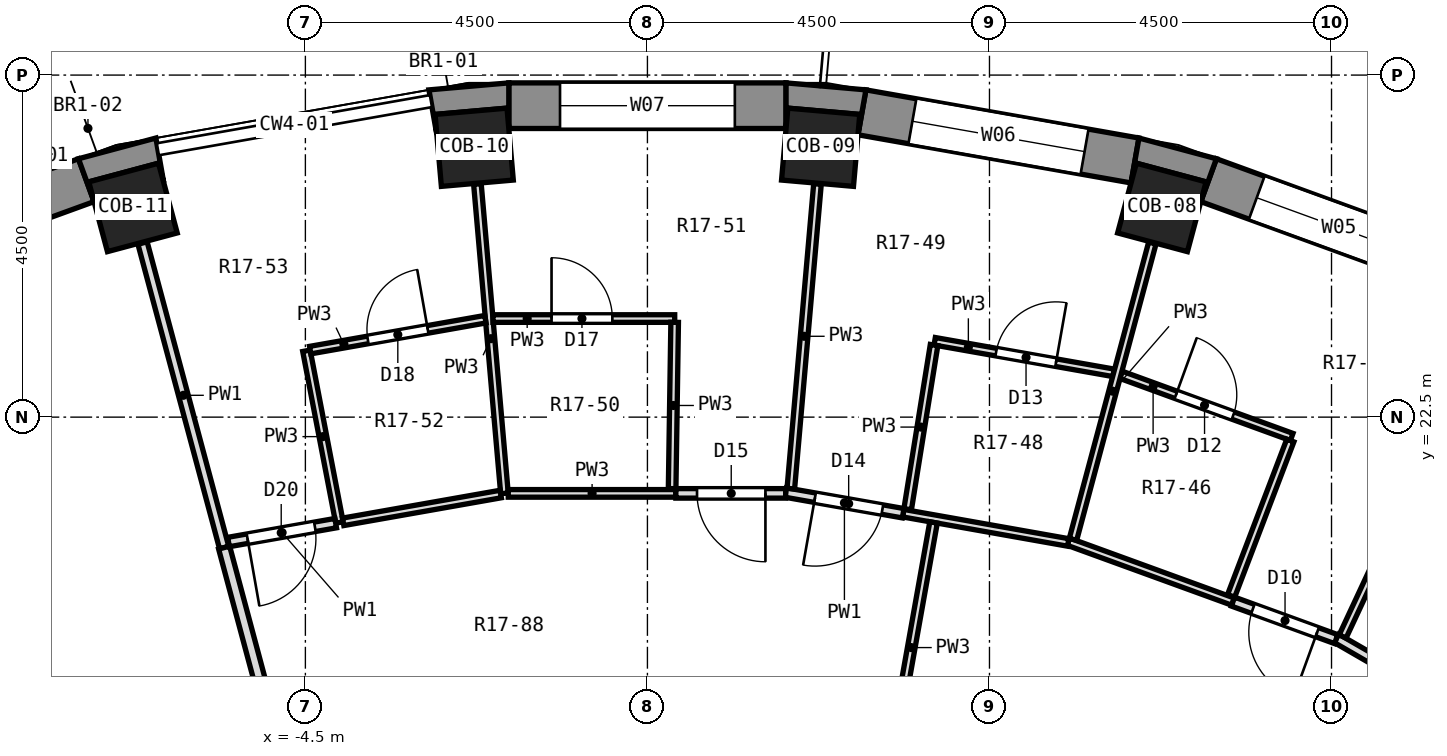
"""IFC4 building model, lengths in metres.
Left out: names, types, materials, properties, quantities, classifications, styles, units other than length and angle.
Written with IfcOpenShell. Run it as: python <this file> out.ifc"""

import sys

from ifc_helpers import new_model, si_unit, direction, frame, frame_2d, origin, origin_2d, place, context, subcontext, project, spatial, polyline, rectangle, outline, extrude, element, fill, save


model = new_model("IFC4")
c1 = context("Model", 3, precision=1e-05, world=origin(), true_north=direction((0.0, 1.0)))
c2 = subcontext(c1, "Body", "Model", "MODEL_VIEW")
j1 = project(units=[si_unit("LENGTHUNIT", "METRE"), si_unit("PLANEANGLEUNIT", "RADIAN")], contexts=[c1])
p1 = place(None, origin())
s1 = spatial("IfcSite", under=j1, at=p1, CompositionType="ELEMENT")
p2 = place(p1, origin())
s2 = spatial("IfcBuilding", under=s1, at=p2, CompositionType="ELEMENT")
p3 = place(p2, frame((0.0, 0.0, 91.9)))
s3 = spatial("IfcBuildingStorey", under=s2, at=p3, CompositionType="ELEMENT", Elevation=91.9)
for number, where, z_axis, x_axis in (
    (1, (6.768, 25.259, 0.0), (0.0, 0.0, 1.0), (0.259, 0.966, 0.0)),
    (2, (2.279, 26.051, 0.0), (0.0, 0.0, 1.0), (0.087, 0.996, 0.0)),
    (3, (-2.279, 26.051, 0.0), (0.0, 0.0, 1.0), (-0.087, 0.996, 0.0)),
    (4, (-6.768, 25.259, 0.0), (0.0, 0.0, 1.0), (-0.259, 0.966, 0.0)),
):
    element("IfcColumn", number, at=place(p3, frame(where, z_axis=z_axis, x_axis=x_axis)), inside=s3, PredefinedType="COLUMN", context=c2, shape_type="SweptSolid", body=[
        extrude(rectangle(XDim=0.95, YDim=0.95, at=origin_2d()), origin(), (0.0, 0.0, 1.0), 3.3),
    ])
p4 = place(p3, frame((10.811, 24.369, 0.0), z_axis=(0.0, 0.0, 1.0), x_axis=(-0.939703505393, 0.341990236633, 0.0)))
e5 = element("IfcWall", 5, at=p4, inside=s3, PredefinedType="SOLIDWALL", context=c2, shape_type="SweptSolid", body=[
    extrude(rectangle(XDim=3.648, YDim=0.6, at=frame_2d((1.824, 0.0))), origin(), (0.0, 0.0, 1.0), 2.8),
])
p5 = place(p4, frame((0.674, 0.0, 0.9)))
e6 = element("IfcOpeningElement", 6, at=p5, cuts=e5, PredefinedType="OPENING", context=c2, shape_type="SweptSolid", body=[
    extrude(rectangle(XDim=2.3, YDim=1.8, at=frame_2d((1.15, 0.9))), frame((0.0, 0.312, 0.0), z_axis=(0.0, -1.0, 0.0), x_axis=(1.0, 0.0, 0.0)), (0.0, 0.0, 1.0), 0.624),
])
p6 = place(p3, frame((6.415, 25.876, 0.0), z_axis=(0.0, 0.0, 1.0), x_axis=(-0.984803764455, 0.173670796382, 0.0)))
e7 = element("IfcWall", 7, at=p6, inside=s3, PredefinedType="SOLIDWALL", context=c2, shape_type="SweptSolid", body=[
    extrude(rectangle(XDim=3.648, YDim=0.6, at=frame_2d((1.824, 0.0))), origin(), (0.0, 0.0, 1.0), 2.8),
])
p7 = place(p6, frame((0.674, 0.0, 0.9)))
e8 = element("IfcOpeningElement", 8, at=p7, cuts=e7, PredefinedType="OPENING", context=c2, shape_type="SweptSolid", body=[
    extrude(rectangle(XDim=2.3, YDim=1.8, at=frame_2d((1.15, 0.9))), frame((0.0, 0.312, 0.0), z_axis=(0.0, -1.0, 0.0), x_axis=(1.0, 0.0, 0.0)), (0.0, 0.0, 1.0), 0.624),
])
p8 = place(p3, frame((1.824, 26.597, 0.0), z_axis=(0.0, 0.0, 1.0), x_axis=(-1.0, 0.0, 0.0)))
e9 = element("IfcWall", 9, at=p8, inside=s3, PredefinedType="SOLIDWALL", context=c2, shape_type="SweptSolid", body=[
    extrude(rectangle(XDim=3.648, YDim=0.6, at=frame_2d((1.824, 0.0))), origin(), (0.0, 0.0, 1.0), 2.8),
])
p9 = place(p8, frame((0.674, 0.0, 0.9)))
e10 = element("IfcOpeningElement", 10, at=p9, cuts=e9, PredefinedType="OPENING", context=c2, shape_type="SweptSolid", body=[
    extrude(rectangle(XDim=2.3, YDim=1.8, at=frame_2d((1.15, 0.9))), frame((0.0, 0.312, 0.0), z_axis=(0.0, -1.0, 0.0), x_axis=(1.0, 0.0, 0.0)), (0.0, 0.0, 1.0), 0.624),
])
p10 = place(p3, frame((-7.383, 25.617, 0.0), z_axis=(0.0, 0.0, 1.0), x_axis=(-0.939703505393, -0.341990236633, 0.0)))
e11 = element("IfcWall", 11, at=p10, inside=s3, PredefinedType="SOLIDWALL", context=c2, shape_type="SweptSolid", body=[
    extrude(rectangle(XDim=3.648, YDim=0.6, at=frame_2d((1.824, 0.0))), origin(), (0.0, 0.0, 1.0), 2.8),
])
p11 = place(p10, frame((0.974, 0.0, 0.0)))
e12 = element("IfcOpeningElement", 12, at=p11, cuts=e11, PredefinedType="OPENING", context=c2, shape_type="SweptSolid", body=[
    extrude(rectangle(XDim=1.7, YDim=2.4, at=frame_2d((0.85, 1.2))), frame((0.0, 0.312, 0.0), z_axis=(0.0, -1.0, 0.0), x_axis=(1.0, 0.0, 0.0)), (0.0, 0.0, 1.0), 0.624),
])
p12 = place(p3, origin())
e13 = element("IfcWall", 13, at=p12, inside=s3, PredefinedType="SOLIDWALL", context=c2, shape_type="SweptSolid", body=[
    extrude(outline(polyline([(7.486, 25.899), (6.467, 26.172), (6.363, 25.581), (6.432, 25.841), (7.35, 25.595), (7.28, 25.335), (7.486, 25.899)])), origin(), (0.0, 0.0, 1.0), 2.8),
])
p13 = place(p3, origin())
e14 = element("IfcWall", 14, at=p13, inside=s3, PredefinedType="SOLIDWALL", context=c2, shape_type="SweptSolid", body=[
    extrude(outline(polyline([(2.875, 26.805), (1.824, 26.897), (1.824, 26.297), (1.847, 26.565), (2.794, 26.482), (2.77, 26.215), (2.875, 26.805)])), origin(), (0.0, 0.0, 1.0), 2.8),
])
p14 = place(p3, origin())
e15 = element("IfcWall", 15, at=p14, inside=s3, PredefinedType="SOLIDWALL", context=c2, shape_type="SweptSolid", body=[
    extrude(outline(polyline([(-2.875, 26.805), (-2.77, 26.215), (-2.794, 26.482), (-1.847, 26.565), (-1.824, 26.297), (-1.824, 26.897), (-2.875, 26.805)])), origin(), (0.0, 0.0, 1.0), 2.8),
])
p15 = place(p3, origin())
e16 = element("IfcWall", 16, at=p15, inside=s3, PredefinedType="SOLIDWALL", context=c2, shape_type="SweptSolid", body=[
    extrude(outline(polyline([(-6.467, 26.172), (-7.486, 25.899), (-7.28, 25.335), (-7.35, 25.595), (-6.432, 25.841), (-6.363, 25.581), (-6.467, 26.172)])), origin(), (0.0, 0.0, 1.0), 2.8),
])
p16 = place(p3, origin())
e17 = element("IfcWall", 17, at=p16, inside=s3, PredefinedType="PARAPET", context=c2, shape_type="SweptSolid", body=[
    extrude(outline(polyline([(-7.573, 28.262), (-12.365, 26.517), (-16.782, 23.967), (-16.437, 23.474), (-12.111, 25.971), (-7.417, 27.68), (-7.573, 28.262)])), origin(), (0.0, 0.0, 1.0), 0.5),
])
p17 = place(p3, frame((-2.237, 25.567, 0.0), z_axis=(0.0, 0.0, 1.0), x_axis=(0.087060211484, -0.996203051379, 0.0)))
e18 = element("IfcWall", 18, at=p17, inside=s3, PredefinedType="PARTITIONING", context=c2, shape_type="SweptSolid", body=[
    extrude(rectangle(XDim=4.086, YDim=0.1, at=frame_2d((2.043, 0.0))), origin(), (0.0, 0.0, 1.0), 2.8),
])
p18 = place(p3, frame((-4.486, 23.373, 0.0), z_axis=(0.0, 0.0, 1.0), x_axis=(0.188701744684, -0.982034445197, 0.0)))
e19 = element("IfcWall", 19, at=p18, inside=s3, PredefinedType="PARTITIONING", context=c2, shape_type="SweptSolid", body=[
    extrude(rectangle(XDim=2.3, YDim=0.1, at=frame_2d((1.15, 0.0))), origin(), (0.0, 0.0, 1.0), 2.8),
])
p19 = place(p3, frame((-6.642, 24.791, 0.0), z_axis=(0.0, 0.0, 1.0), x_axis=(0.258787077678, -0.965934391368, 0.0)))
e20 = element("IfcWall", 20, at=p19, inside=s3, PredefinedType="PARTITIONING", context=c2, shape_type="SweptSolid", body=[
    extrude(rectangle(XDim=4.148, YDim=0.125, at=frame_2d((2.074, 0.0))), origin(), (0.0, 0.0, 1.0), 2.8),
])
p20 = place(p3, frame((-5.569, 20.784, 0.0), z_axis=(0.0, 0.0, 1.0), x_axis=(0.258810886784, -0.965928012267, 0.0)))
e21 = element("IfcWall", 21, at=p20, inside=s3, PredefinedType="PARTITIONING", context=c2, shape_type="SweptSolid", body=[
    extrude(rectangle(XDim=4.949, YDim=0.15, at=frame_2d((2.474, 0.0))), origin(), (0.0, 0.0, 1.0), 2.8),
])
p21 = place(p3, frame((9.065, 19.59, 0.0), z_axis=(0.0, 0.0, 1.0), x_axis=(0.865961876044, -0.500110017135, 0.0)))
e22 = element("IfcWall", 22, at=p21, inside=s3, PredefinedType="PARTITIONING", context=c2, shape_type="SweptSolid", body=[
    extrude(rectangle(XDim=3.762, YDim=0.125, at=frame_2d((1.881, 0.0))), origin(), (0.0, 0.0, 1.0), 2.8),
])
p22 = place(p21, frame((1.494, 0.0, 0.0)))
e23 = element("IfcOpeningElement", 23, at=p22, cuts=e22, PredefinedType="OPENING", context=c2, shape_type="SweptSolid", body=[
    extrude(rectangle(XDim=0.9, YDim=2.1, at=frame_2d((0.45, 1.05))), frame((0.0, 0.074, 0.0), z_axis=(0.0, -1.0, 0.0), x_axis=(1.0, 0.0, 0.0)), (0.0, 0.0, 1.0), 0.149),
])
p23 = place(p3, frame((5.537, 20.861, 0.0), z_axis=(0.0, 0.0, 1.0), x_axis=(0.939734670151, -0.34190459154, 0.0)))
e24 = element("IfcWall", 24, at=p23, inside=s3, PredefinedType="PARTITIONING", context=c2, shape_type="SweptSolid", body=[
    extrude(rectangle(XDim=2.306, YDim=0.1, at=frame_2d((1.153, 0.0))), origin(), (0.0, 0.0, 1.0), 2.8),
])
p24 = place(p3, frame((7.704, 20.073, 0.0), z_axis=(0.0, 0.0, 1.0), x_axis=(0.939763804893, -0.341824503237, 0.0)))
e25 = element("IfcWall", 25, at=p24, inside=s3, PredefinedType="PARTITIONING", context=c2, shape_type="SweptSolid", body=[
    extrude(rectangle(XDim=1.444, YDim=0.125, at=frame_2d((0.722, 0.0))), origin(), (0.0, 0.0, 1.0), 2.8),
])
p25 = place(p24, frame((0.278, 0.0, 0.0)))
e26 = element("IfcOpeningElement", 26, at=p25, cuts=e25, PredefinedType="OPENING", context=c2, shape_type="SweptSolid", body=[
    extrude(rectangle(XDim=0.9, YDim=2.1, at=frame_2d((0.45, 1.05))), frame((0.0, 0.074, 0.0), z_axis=(0.0, -1.0, 0.0), x_axis=(1.0, 0.0, 0.0)), (0.0, 0.0, 1.0), 0.149),
])
p26 = place(p3, frame((6.23, 23.057, 0.0), z_axis=(0.0, 0.0, 1.0), x_axis=(0.939644231496, -0.342153062556, 0.0)))
e27 = element("IfcWall", 27, at=p26, inside=s3, PredefinedType="PARTITIONING", context=c2, shape_type="SweptSolid", body=[
    extrude(rectangle(XDim=2.39, YDim=0.1, at=frame_2d((1.195, 0.0))), origin(), (0.0, 0.0, 1.0), 2.8),
])
p27 = place(p26, frame((0.77, 0.0, 0.0)))
e28 = element("IfcOpeningElement", 28, at=p27, cuts=e27, PredefinedType="OPENING", context=c2, shape_type="SweptSolid", body=[
    extrude(rectangle(XDim=0.8, YDim=2.1, at=frame_2d((0.4, 1.05))), frame((0.0, 0.062, 0.0), z_axis=(0.0, -1.0, 0.0), x_axis=(1.0, 0.0, 0.0)), (0.0, 0.0, 1.0), 0.124),
])
p28 = place(p3, frame((3.365, 21.236, 0.0), z_axis=(0.0, 0.0, 1.0), x_axis=(0.98465059855, -0.174537098562, 0.0)))
e29 = element("IfcWall", 29, at=p28, inside=s3, PredefinedType="PARTITIONING", context=c2, shape_type="SweptSolid", body=[
    extrude(rectangle(XDim=2.205, YDim=0.1, at=frame_2d((1.102, 0.0))), origin(), (0.0, 0.0, 1.0), 2.8),
])
p29 = place(p3, frame((1.819, 21.508, 0.0), z_axis=(0.0, 0.0, 1.0), x_axis=(0.984825798369, -0.17354580625, 0.0)))
e30 = element("IfcWall", 30, at=p29, inside=s3, PredefinedType="PARTITIONING", context=c2, shape_type="SweptSolid", body=[
    extrude(rectangle(XDim=1.57, YDim=0.125, at=frame_2d((0.785, 0.0))), origin(), (0.0, 0.0, 1.0), 2.8),
])
p30 = place(p29, frame((0.392, 0.0, 0.0)))
e31 = element("IfcOpeningElement", 31, at=p30, cuts=e30, PredefinedType="OPENING", context=c2, shape_type="SweptSolid", body=[
    extrude(rectangle(XDim=0.9, YDim=2.1, at=frame_2d((0.45, 1.05))), frame((0.0, 0.074, 0.0), z_axis=(0.0, -1.0, 0.0), x_axis=(1.0, 0.0, 0.0)), (0.0, 0.0, 1.0), 0.149),
])
p31 = place(p3, frame((3.779, 23.498, 0.0), z_axis=(0.0, 0.0, 1.0), x_axis=(0.984802055472, -0.173680486922, 0.0)))
e32 = element("IfcWall", 32, at=p31, inside=s3, PredefinedType="PARTITIONING", context=c2, shape_type="SweptSolid", body=[
    extrude(rectangle(XDim=2.391, YDim=0.1, at=frame_2d((1.196, 0.0))), origin(), (0.0, 0.0, 1.0), 2.8),
])
p32 = place(p31, frame((0.821, 0.0, 0.0)))
e33 = element("IfcOpeningElement", 33, at=p32, cuts=e32, PredefinedType="OPENING", context=c2, shape_type="SweptSolid", body=[
    extrude(rectangle(XDim=0.8, YDim=2.1, at=frame_2d((0.4, 1.05))), frame((0.0, 0.062, 0.0), z_axis=(0.0, -1.0, 0.0), x_axis=(1.0, 0.0, 0.0)), (0.0, 0.0, 1.0), 0.124),
])
p33 = place(p3, frame((-1.831, 21.497, 0.0), z_axis=(0.0, 0.0, 1.0), x_axis=(1.0, 0.0, 0.0)))
e34 = element("IfcWall", 34, at=p33, inside=s3, PredefinedType="PARTITIONING", context=c2, shape_type="SweptSolid", body=[
    extrude(rectangle(XDim=2.205, YDim=0.1, at=frame_2d((1.103, 0.0))), origin(), (0.0, 0.0, 1.0), 2.8),
])
p34 = place(p3, frame((0.374, 21.497, 0.0), z_axis=(0.0, 0.0, 1.0), x_axis=(1.0, 0.0, 0.0)))
e35 = element("IfcWall", 35, at=p34, inside=s3, PredefinedType="PARTITIONING", context=c2, shape_type="SweptSolid", body=[
    extrude(rectangle(XDim=1.445, YDim=0.125, at=frame_2d((0.722, 0.0))), origin(), (0.0, 0.0, 1.0), 2.8),
])
p35 = place(p34, frame((0.279, 0.0, 0.0)))
e36 = element("IfcOpeningElement", 36, at=p35, cuts=e35, PredefinedType="OPENING", context=c2, shape_type="SweptSolid", body=[
    extrude(rectangle(XDim=0.9, YDim=2.1, at=frame_2d((0.45, 1.05))), frame((0.0, 0.074, 0.0), z_axis=(0.0, -1.0, 0.0), x_axis=(1.0, 0.0, 0.0)), (0.0, 0.0, 1.0), 0.149),
])
p36 = place(p3, frame((-2.032, 23.797, 0.0), z_axis=(0.0, 0.0, 1.0), x_axis=(1.0, 0.0, 0.0)))
e37 = element("IfcWall", 37, at=p36, inside=s3, PredefinedType="PARTITIONING", context=c2, shape_type="SweptSolid", body=[
    extrude(rectangle(XDim=2.391, YDim=0.1, at=frame_2d((1.195, 0.0))), origin(), (0.0, 0.0, 1.0), 2.8),
])
p37 = place(p36, frame((0.771, 0.0, 0.0)))
e38 = element("IfcOpeningElement", 38, at=p37, cuts=e37, PredefinedType="OPENING", context=c2, shape_type="SweptSolid", body=[
    extrude(rectangle(XDim=0.8, YDim=2.1, at=frame_2d((0.4, 1.05))), frame((0.0, 0.062, 0.0), z_axis=(0.0, -1.0, 0.0), x_axis=(1.0, 0.0, 0.0)), (0.0, 0.0, 1.0), 0.124),
])
p38 = place(p3, frame((-4.003, 21.123, 0.0), z_axis=(0.0, 0.0, 1.0), x_axis=(0.984804573467, 0.173666208797, 0.0)))
e39 = element("IfcWall", 39, at=p38, inside=s3, PredefinedType="PARTITIONING", context=c2, shape_type="SweptSolid", body=[
    extrude(rectangle(XDim=2.104, YDim=0.1, at=frame_2d((1.052, 0.0))), origin(), (0.0, 0.0, 1.0), 2.8),
])
p39 = place(p3, frame((-5.511, 20.857, 0.0), z_axis=(0.0, 0.0, 1.0), x_axis=(0.984845301527, 0.173435094659, 0.0)))
e40 = element("IfcWall", 40, at=p39, inside=s3, PredefinedType="PARTITIONING", context=c2, shape_type="SweptSolid", body=[
    extrude(rectangle(XDim=1.432, YDim=0.125, at=frame_2d((0.716, 0.0))), origin(), (0.0, 0.0, 1.0), 2.8),
])
p40 = place(p39, frame((0.254, 0.0, 0.0)))
e41 = element("IfcOpeningElement", 41, at=p40, cuts=e40, PredefinedType="OPENING", context=c2, shape_type="SweptSolid", body=[
    extrude(rectangle(XDim=0.9, YDim=2.1, at=frame_2d((0.45, 1.05))), frame((0.0, 0.074, 0.0), z_axis=(0.0, -1.0, 0.0), x_axis=(1.0, 0.0, 0.0)), (0.0, 0.0, 1.0), 0.149),
])
p41 = place(p3, frame((-4.437, 23.382, 0.0), z_axis=(0.0, 0.0, 1.0), x_axis=(0.984790907087, 0.173743688574, 0.0)))
e42 = element("IfcWall", 42, at=p41, inside=s3, PredefinedType="PARTITIONING", context=c2, shape_type="SweptSolid", body=[
    extrude(rectangle(XDim=2.341, YDim=0.1, at=frame_2d((1.17, 0.0))), origin(), (0.0, 0.0, 1.0), 2.8),
])
p42 = place(p41, frame((0.771, 0.0, 0.0)))
e43 = element("IfcOpeningElement", 43, at=p42, cuts=e42, PredefinedType="OPENING", context=c2, shape_type="SweptSolid", body=[
    extrude(rectangle(XDim=0.8, YDim=2.1, at=frame_2d((0.4, 1.05))), frame((0.0, 0.062, 0.0), z_axis=(0.0, -1.0, 0.0), x_axis=(1.0, 0.0, 0.0)), (0.0, 0.0, 1.0), 0.124),
])
p43 = place(p3, frame((9.146, 19.615, 0.0), z_axis=(0.0, 0.0, 1.0), x_axis=(0.422622950513, 0.906305600612, 0.0)))
e44 = element("IfcWall", 44, at=p43, inside=s3, PredefinedType="PARTITIONING", context=c2, shape_type="SweptSolid", body=[
    extrude(rectangle(XDim=4.022, YDim=0.1, at=frame_2d((2.011, 0.0))), origin(), (0.0, 0.0, 1.0), 2.8),
])
p44 = place(p3, frame((7.679, 20.149, 0.0), z_axis=(0.0, 0.0, 1.0), x_axis=(0.356134598474, 0.93443466747, 0.0)))
e45 = element("IfcWall", 45, at=p44, inside=s3, PredefinedType="PARTITIONING", context=c2, shape_type="SweptSolid", body=[
    extrude(rectangle(XDim=2.187, YDim=0.1, at=frame_2d((1.093, 0.0))), origin(), (0.0, 0.0, 1.0), 2.8),
])
p45 = place(p3, frame((5.599, 20.892, 0.0), z_axis=(0.0, 0.0, 1.0), x_axis=(0.258615129659, 0.965980442199, 0.0)))
e46 = element("IfcWall", 46, at=p45, inside=s3, PredefinedType="PARTITIONING", context=c2, shape_type="SweptSolid", body=[
    extrude(rectangle(XDim=4.036, YDim=0.1, at=frame_2d((2.018, 0.0))), origin(), (0.0, 0.0, 1.0), 2.8),
])
p46 = place(p3, frame((3.178, 17.821, 0.0), z_axis=(0.0, 0.0, 1.0), x_axis=(0.175313184309, 0.984512715716, 0.0)))
e47 = element("IfcWall", 47, at=p46, inside=s3, PredefinedType="PARTITIONING", context=c2, shape_type="SweptSolid", body=[
    extrude(rectangle(XDim=3.345, YDim=0.1, at=frame_2d((1.672, 0.0))), origin(), (0.0, 0.0, 1.0), 2.8),
])
p47 = place(p3, frame((3.424, 21.289, 0.0), z_axis=(0.0, 0.0, 1.0), x_axis=(0.1586042635, 0.987342234283, 0.0)))
e48 = element("IfcWall", 48, at=p47, inside=s3, PredefinedType="PARTITIONING", context=c2, shape_type="SweptSolid", body=[
    extrude(rectangle(XDim=2.187, YDim=0.1, at=frame_2d((1.094, 0.0))), origin(), (0.0, 0.0, 1.0), 2.8),
])
p48 = place(p3, frame((1.886, 21.559, 0.0), z_axis=(0.0, 0.0, 1.0), x_axis=(0.087137593131, 0.996196285811, 0.0)))
e49 = element("IfcWall", 49, at=p48, inside=s3, PredefinedType="PARTITIONING", context=c2, shape_type="SweptSolid", body=[
    extrude(rectangle(XDim=4.023, YDim=0.1, at=frame_2d((2.012, 0.0))), origin(), (0.0, 0.0, 1.0), 2.8),
])
p49 = place(p3, frame((0.325, 21.56, 0.0), z_axis=(0.0, 0.0, 1.0), x_axis=(0.015176823242, 0.999884825386, 0.0)))
e50 = element("IfcWall", 50, at=p49, inside=s3, PredefinedType="PARTITIONING", context=c2, shape_type="SweptSolid", body=[
    extrude(rectangle(XDim=2.188, YDim=0.1, at=frame_2d((1.094, 0.0))), origin(), (0.0, 0.0, 1.0), 2.8),
])
p50 = place(p5, origin())
e51 = element("IfcWindow", 51, at=p50, inside=s3, PartitioningType="SINGLE_PANEL", PredefinedType="WINDOW", context=c2, shape_type="SweptSolid", body=[
    extrude(rectangle(XDim=2.3, YDim=1.8, at=frame_2d((1.15, 0.9))), frame((0.0, 0.18, 0.0), z_axis=(0.0, -1.0, 0.0), x_axis=(1.0, 0.0, 0.0)), (0.0, 0.0, 1.0), 0.06),
])
fill(e6, e51)
p51 = place(p7, origin())
e52 = element("IfcWindow", 52, at=p51, inside=s3, PartitioningType="SINGLE_PANEL", PredefinedType="WINDOW", context=c2, shape_type="SweptSolid", body=[
    extrude(rectangle(XDim=2.3, YDim=1.8, at=frame_2d((1.15, 0.9))), frame((0.0, 0.18, 0.0), z_axis=(0.0, -1.0, 0.0), x_axis=(1.0, 0.0, 0.0)), (0.0, 0.0, 1.0), 0.06),
])
fill(e8, e52)
p52 = place(p9, origin())
e53 = element("IfcWindow", 53, at=p52, inside=s3, PartitioningType="SINGLE_PANEL", PredefinedType="WINDOW", context=c2, shape_type="SweptSolid", body=[
    extrude(rectangle(XDim=2.3, YDim=1.8, at=frame_2d((1.15, 0.9))), frame((0.0, 0.18, 0.0), z_axis=(0.0, -1.0, 0.0), x_axis=(1.0, 0.0, 0.0)), (0.0, 0.0, 1.0), 0.06),
])
fill(e10, e53)
p53 = place(p25, frame((0.9, 0.0, 0.0), z_axis=(0.0, 0.0, 1.0), x_axis=(-1.0, 0.0, 0.0)))
e54 = element("IfcDoor", 54, at=p53, inside=s3, OperationType="SINGLE_SWING_LEFT", PredefinedType="DOOR", context=c2, shape_type="SweptSolid", body=[
    extrude(rectangle(XDim=0.9, YDim=2.1, at=frame_2d((0.45, 1.05))), frame((0.0, 0.025, 0.0), z_axis=(0.0, -1.0, 0.0), x_axis=(1.0, 0.0, 0.0)), (0.0, 0.0, 1.0), 0.05),
])
fill(e26, e54)
p54 = place(p27, origin())
e55 = element("IfcDoor", 55, at=p54, inside=s3, OperationType="SINGLE_SWING_LEFT", PredefinedType="DOOR", context=c2, shape_type="SweptSolid", body=[
    extrude(rectangle(XDim=0.8, YDim=2.1, at=frame_2d((0.4, 1.05))), frame((0.0, 0.025, 0.0), z_axis=(0.0, -1.0, 0.0), x_axis=(1.0, 0.0, 0.0)), (0.0, 0.0, 1.0), 0.05),
])
fill(e28, e55)
p55 = place(p32, origin())
e56 = element("IfcDoor", 56, at=p55, inside=s3, OperationType="SINGLE_SWING_RIGHT", PredefinedType="DOOR", context=c2, shape_type="SweptSolid", body=[
    extrude(rectangle(XDim=0.8, YDim=2.1, at=frame_2d((0.4, 1.05))), frame((0.0, 0.025, 0.0), z_axis=(0.0, -1.0, 0.0), x_axis=(1.0, 0.0, 0.0)), (0.0, 0.0, 1.0), 0.05),
])
fill(e33, e56)
p56 = place(p30, frame((0.9, 0.0, 0.0), z_axis=(0.0, 0.0, 1.0), x_axis=(-1.0, 0.0, 0.0)))
e57 = element("IfcDoor", 57, at=p56, inside=s3, OperationType="SINGLE_SWING_RIGHT", PredefinedType="DOOR", context=c2, shape_type="SweptSolid", body=[
    extrude(rectangle(XDim=0.9, YDim=2.1, at=frame_2d((0.45, 1.05))), frame((0.0, 0.025, 0.0), z_axis=(0.0, -1.0, 0.0), x_axis=(1.0, 0.0, 0.0)), (0.0, 0.0, 1.0), 0.05),
])
fill(e31, e57)
p57 = place(p35, frame((0.9, 0.0, 0.0), z_axis=(0.0, 0.0, 1.0), x_axis=(-1.0, 0.0, 0.0)))
e58 = element("IfcDoor", 58, at=p57, inside=s3, OperationType="SINGLE_SWING_LEFT", PredefinedType="DOOR", context=c2, shape_type="SweptSolid", body=[
    extrude(rectangle(XDim=0.9, YDim=2.1, at=frame_2d((0.45, 1.05))), frame((0.0, 0.025, 0.0), z_axis=(0.0, -1.0, 0.0), x_axis=(1.0, 0.0, 0.0)), (0.0, 0.0, 1.0), 0.05),
])
fill(e36, e58)
p58 = place(p37, origin())
e59 = element("IfcDoor", 59, at=p58, inside=s3, OperationType="SINGLE_SWING_LEFT", PredefinedType="DOOR", context=c2, shape_type="SweptSolid", body=[
    extrude(rectangle(XDim=0.8, YDim=2.1, at=frame_2d((0.4, 1.05))), frame((0.0, 0.025, 0.0), z_axis=(0.0, -1.0, 0.0), x_axis=(1.0, 0.0, 0.0)), (0.0, 0.0, 1.0), 0.05),
])
fill(e38, e59)
p59 = place(p42, origin())
e60 = element("IfcDoor", 60, at=p59, inside=s3, OperationType="SINGLE_SWING_RIGHT", PredefinedType="DOOR", context=c2, shape_type="SweptSolid", body=[
    extrude(rectangle(XDim=0.8, YDim=2.1, at=frame_2d((0.4, 1.05))), frame((0.0, 0.025, 0.0), z_axis=(0.0, -1.0, 0.0), x_axis=(1.0, 0.0, 0.0)), (0.0, 0.0, 1.0), 0.05),
])
fill(e43, e60)
p60 = place(p40, frame((0.9, 0.0, 0.0), z_axis=(0.0, 0.0, 1.0), x_axis=(-1.0, 0.0, 0.0)))
e61 = element("IfcDoor", 61, at=p60, inside=s3, OperationType="SINGLE_SWING_RIGHT", PredefinedType="DOOR", context=c2, shape_type="SweptSolid", body=[
    extrude(rectangle(XDim=0.9, YDim=2.1, at=frame_2d((0.45, 1.05))), frame((0.0, 0.025, 0.0), z_axis=(0.0, -1.0, 0.0), x_axis=(1.0, 0.0, 0.0)), (0.0, 0.0, 1.0), 0.05),
])
fill(e41, e61)
save(model, sys.argv[1])
